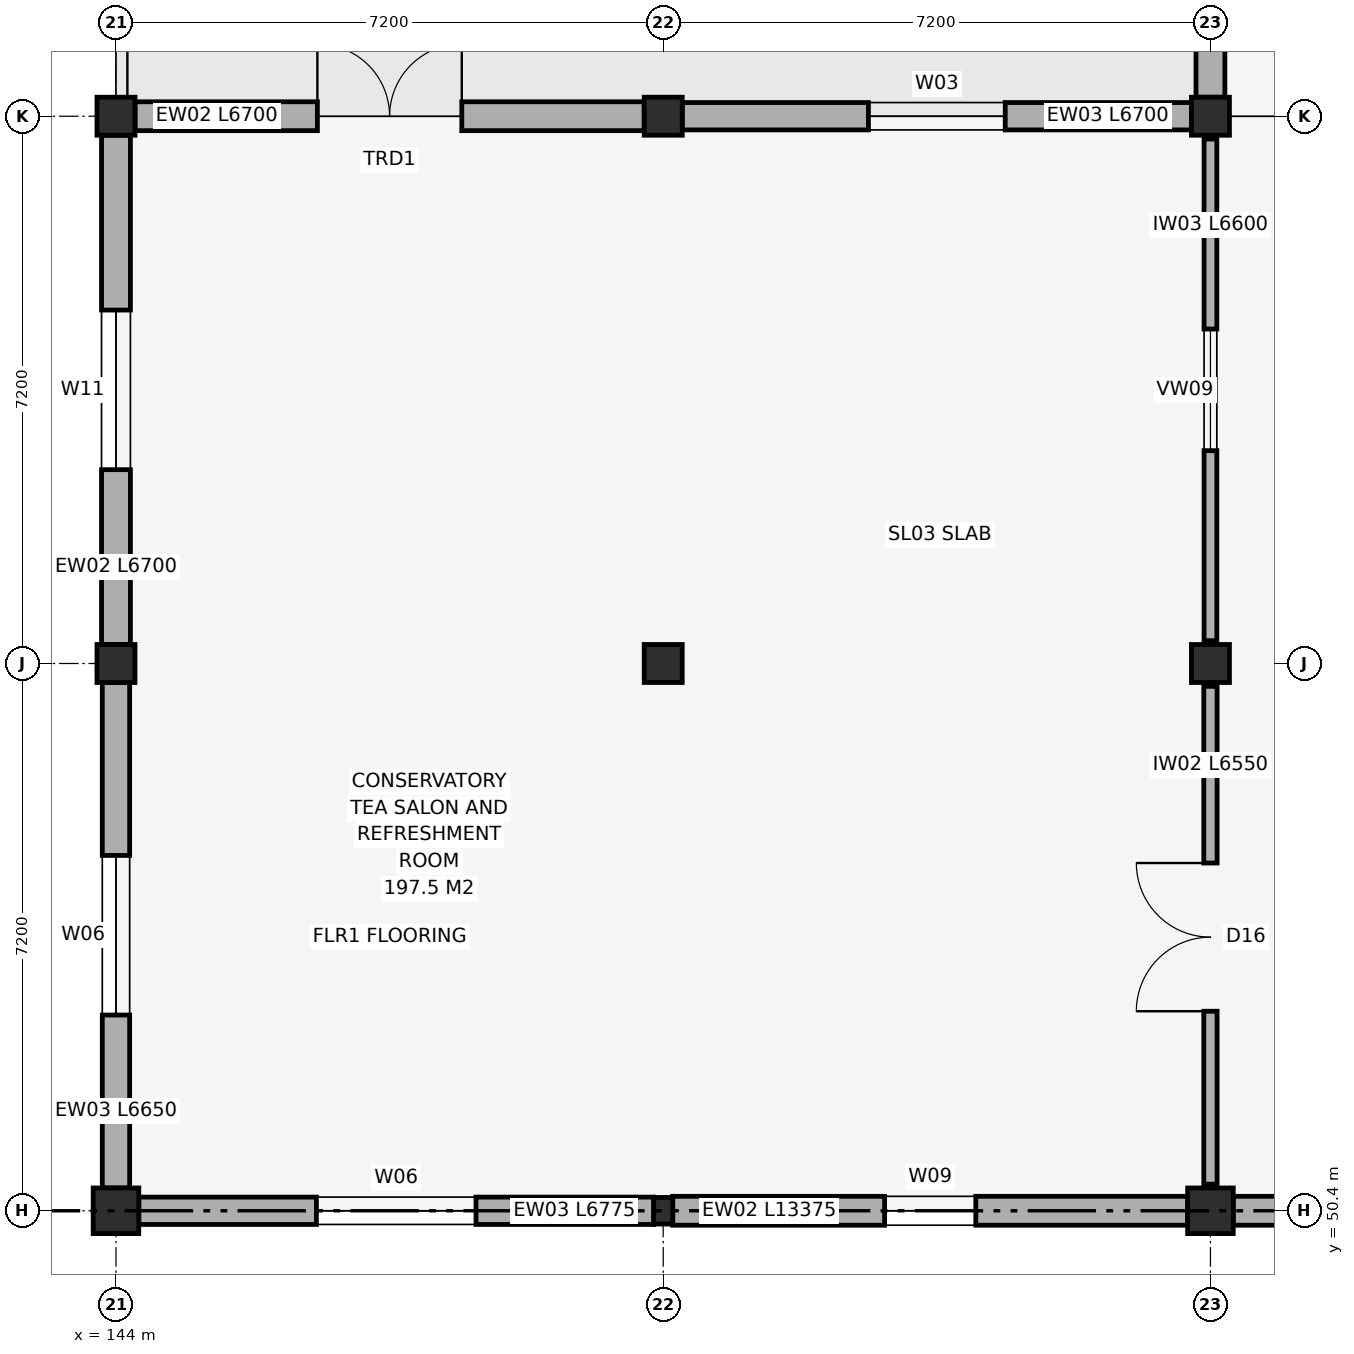
"""IFC4 building model, lengths in metres.
Left out: names, types, materials, properties, quantities, classifications, styles, units other than length and angle.
Written with IfcOpenShell. Run it as: python <this file> out.ifc"""

import sys

from ifc_helpers import new_model, si_unit, direction, frame, frame_2d, origin, origin_2d, place, context, subcontext, project, spatial, rectangle, hollow_rectangle, extrude, element, fill, save


model = new_model("IFC4")
c1 = context("Model", 3, precision=1e-05, world=origin(), true_north=direction((0.0, 1.0)))
c2 = subcontext(c1, "Body", "Model", "MODEL_VIEW")
j1 = project(units=[si_unit("LENGTHUNIT", "METRE"), si_unit("PLANEANGLEUNIT", "RADIAN")], contexts=[c1])
p1 = place(None, origin())
s1 = spatial("IfcSite", under=j1, at=p1, CompositionType="ELEMENT")
p2 = place(p1, origin())
s2 = spatial("IfcBuilding", under=s1, at=p2, CompositionType="ELEMENT")
p3 = place(p2, frame((0.0, 0.0, 15.0)))
s3 = spatial("IfcBuildingStorey", under=s2, at=p3, CompositionType="ELEMENT", Elevation=15.0)
p4 = place(p3, frame((144.0, 50.4, 0.0), z_axis=(0.0, 0.0, 1.0), x_axis=(1.0, 0.0, 0.0)))
e1 = element("IfcColumn", 1, at=p4, inside=s3, PredefinedType="COLUMN", context=c2, shape_type="SweptSolid", body=[
    extrude(rectangle(XDim=0.6, YDim=0.6, at=origin_2d()), origin(), (0.0, 0.0, 1.0), 4.04),
])
for number, where, z_axis, x_axis in (
    (2, (144.0, 57.6, 0.0), (0.0, 0.0, 1.0), (1.0, 0.0, 0.0)),
    (3, (144.0, 64.8, 0.0), (0.0, 0.0, 1.0), (1.0, 0.0, 0.0)),
):
    element("IfcColumn", number, at=place(p3, frame(where, z_axis=z_axis, x_axis=x_axis)), inside=s3, PredefinedType="COLUMN", context=c2, shape_type="SweptSolid", body=[
        extrude(rectangle(XDim=0.5, YDim=0.5, at=origin_2d()), origin(), (0.0, 0.0, 1.0), 4.04),
    ])
p5 = place(p3, frame((151.2, 50.4, 0.0), z_axis=(0.0, 0.0, 1.0), x_axis=(1.0, 0.0, 0.0)))
e4 = element("IfcColumn", 4, at=p5, inside=s3, PredefinedType="COLUMN", context=c2, shape_type="SweptSolid", body=[
    extrude(hollow_rectangle(XDim=0.25, YDim=0.35, WallThickness=0.012, at=origin_2d()), origin(), (0.0, 0.0, 1.0), 4.04),
])
for number, where, z_axis, x_axis in (
    (5, (151.2, 57.6, 0.0), (0.0, 0.0, 1.0), (1.0, 0.0, 0.0)),
    (6, (151.2, 64.8, 0.0), (0.0, 0.0, 1.0), (1.0, 0.0, 0.0)),
):
    element("IfcColumn", number, at=place(p3, frame(where, z_axis=z_axis, x_axis=x_axis)), inside=s3, PredefinedType="COLUMN", context=c2, shape_type="SweptSolid", body=[
        extrude(rectangle(XDim=0.5, YDim=0.5, at=origin_2d()), origin(), (0.0, 0.0, 1.0), 4.04),
    ])
p6 = place(p3, frame((158.4, 50.4, 0.0), z_axis=(0.0, 0.0, 1.0), x_axis=(1.0, 0.0, 0.0)))
e7 = element("IfcColumn", 7, at=p6, inside=s3, PredefinedType="COLUMN", context=c2, shape_type="SweptSolid", body=[
    extrude(rectangle(XDim=0.6, YDim=0.6, at=origin_2d()), origin(), (0.0, 0.0, 1.0), 4.04),
])
for number, where, z_axis, x_axis in (
    (8, (158.4, 57.6, 0.0), (0.0, 0.0, 1.0), (1.0, 0.0, 0.0)),
    (9, (158.4, 64.8, 0.0), (0.0, 0.0, 1.0), (1.0, 0.0, 0.0)),
):
    element("IfcColumn", number, at=place(p3, frame(where, z_axis=z_axis, x_axis=x_axis)), inside=s3, PredefinedType="COLUMN", context=c2, shape_type="SweptSolid", body=[
        extrude(rectangle(XDim=0.5, YDim=0.5, at=origin_2d()), origin(), (0.0, 0.0, 1.0), 4.04),
    ])
p7 = place(p3, frame((144.3, 50.4, 0.0), z_axis=(0.0, 0.0, 1.0), x_axis=(1.0, 0.0, 0.0)))
e10 = element("IfcWall", 10, at=p7, inside=s3, PredefinedType="SOLIDWALL", context=c2, shape_type="SweptSolid", body=[
    extrude(rectangle(XDim=6.775, YDim=0.36, at=frame_2d((3.387, 0.0))), origin(), (0.0, 0.0, 1.0), 3.65),
])
p8 = place(p7, frame((2.337, 0.0, 0.95)))
e11 = element("IfcOpeningElement", 11, at=p8, cuts=e10, PredefinedType="OPENING", context=c2, shape_type="SweptSolid", body=[
    extrude(rectangle(XDim=2.1, YDim=2.0, at=frame_2d((1.05, 1.0))), frame((0.0, 0.195, 0.0), z_axis=(0.0, -1.0, 0.0), x_axis=(1.0, 0.0, 0.0)), (0.0, 0.0, 1.0), 0.39),
])
p9 = place(p3, frame((151.325, 50.4, 0.0), z_axis=(0.0, 0.0, 1.0), x_axis=(1.0, 0.0, 0.0)))
e12 = element("IfcWall", 12, at=p9, inside=s3, PredefinedType="SOLIDWALL", context=c2, shape_type="SweptSolid", body=[
    extrude(rectangle(XDim=6.775, YDim=0.38, at=frame_2d((3.388, 0.0))), origin(), (0.0, 0.0, 1.0), 3.65),
])
p10 = place(p9, frame((2.788, 0.0, 0.95)))
e13 = element("IfcOpeningElement", 13, at=p10, cuts=e12, PredefinedType="OPENING", context=c2, shape_type="SweptSolid", body=[
    extrude(rectangle(XDim=1.2, YDim=2.0, at=frame_2d((0.6, 1.0))), frame((0.0, 0.205, 0.0), z_axis=(0.0, -1.0, 0.0), x_axis=(1.0, 0.0, 0.0)), (0.0, 0.0, 1.0), 0.41),
])
p11 = place(p3, frame((158.7, 50.4, 0.0), z_axis=(0.0, 0.0, 1.0), x_axis=(1.0, 0.0, 0.0)))
e14 = element("IfcWall", 14, at=p11, inside=s3, PredefinedType="SOLIDWALL", context=c2, shape_type="SweptSolid", body=[
    extrude(rectangle(XDim=6.6, YDim=0.38, at=frame_2d((3.3, 0.0))), origin(), (0.0, 0.0, 1.0), 3.65),
])
p12 = place(p11, frame((2.4, 0.0, 0.95)))
e15 = element("IfcOpeningElement", 15, at=p12, cuts=e14, PredefinedType="OPENING", context=c2, shape_type="SweptSolid", body=[
    extrude(rectangle(XDim=1.8, YDim=1.75, at=frame_2d((0.9, 0.875))), frame((0.0, 0.205, 0.0), z_axis=(0.0, -1.0, 0.0), x_axis=(1.0, 0.0, 0.0)), (0.0, 0.0, 1.0), 0.41),
])
p13 = place(p3, frame((144.25, 64.8, 0.0), z_axis=(0.0, 0.0, 1.0), x_axis=(1.0, 0.0, 0.0)))
e16 = element("IfcWall", 16, at=p13, inside=s3, PredefinedType="SOLIDWALL", context=c2, shape_type="SweptSolid", body=[
    extrude(rectangle(XDim=6.7, YDim=0.38, at=frame_2d((3.35, 0.0))), origin(), (0.0, 0.0, 1.0), 3.65),
])
p14 = place(p13, frame((2.4, 0.0, 0.0)))
e17 = element("IfcOpeningElement", 17, at=p14, cuts=e16, PredefinedType="OPENING", context=c2, shape_type="SweptSolid", body=[
    extrude(rectangle(XDim=1.9, YDim=2.25, at=frame_2d((0.95, 1.125))), frame((0.0, 0.205, 0.0), z_axis=(0.0, -1.0, 0.0), x_axis=(1.0, 0.0, 0.0)), (0.0, 0.0, 1.0), 0.41),
])
p15 = place(p3, frame((151.45, 64.8, 0.0), z_axis=(0.0, 0.0, 1.0), x_axis=(1.0, 0.0, 0.0)))
e18 = element("IfcWall", 18, at=p15, inside=s3, PredefinedType="SOLIDWALL", context=c2, shape_type="SweptSolid", body=[
    extrude(rectangle(XDim=6.7, YDim=0.36, at=frame_2d((3.35, 0.0))), origin(), (0.0, 0.0, 1.0), 3.65),
])
p16 = place(p15, frame((2.45, 0.0, 0.95)))
e19 = element("IfcOpeningElement", 19, at=p16, cuts=e18, PredefinedType="OPENING", context=c2, shape_type="SweptSolid", body=[
    extrude(rectangle(XDim=1.8, YDim=2.2, at=frame_2d((0.9, 1.1))), frame((0.0, 0.195, 0.0), z_axis=(0.0, -1.0, 0.0), x_axis=(1.0, 0.0, 0.0)), (0.0, 0.0, 1.0), 0.39),
])
p17 = place(p3, frame((144.0, 50.7, 0.0), z_axis=(0.0, 0.0, 1.0), x_axis=(0.0, 1.0, 0.0)))
e20 = element("IfcWall", 20, at=p17, inside=s3, PredefinedType="SOLIDWALL", context=c2, shape_type="SweptSolid", body=[
    extrude(rectangle(XDim=6.65, YDim=0.36, at=frame_2d((3.325, 0.0))), origin(), (0.0, 0.0, 1.0), 3.65),
])
p18 = place(p17, frame((2.275, 0.0, 0.95)))
e21 = element("IfcOpeningElement", 21, at=p18, cuts=e20, PredefinedType="OPENING", context=c2, shape_type="SweptSolid", body=[
    extrude(rectangle(XDim=2.1, YDim=2.0, at=frame_2d((1.05, 1.0))), frame((0.0, 0.195, 0.0), z_axis=(0.0, -1.0, 0.0), x_axis=(1.0, 0.0, 0.0)), (0.0, 0.0, 1.0), 0.39),
])
p19 = place(p3, frame((144.0, 57.85, 0.0), z_axis=(0.0, 0.0, 1.0), x_axis=(0.0, 1.0, 0.0)))
e22 = element("IfcWall", 22, at=p19, inside=s3, PredefinedType="SOLIDWALL", context=c2, shape_type="SweptSolid", body=[
    extrude(rectangle(XDim=6.7, YDim=0.38, at=frame_2d((3.35, 0.0))), origin(), (0.0, 0.0, 1.0), 3.65),
])
p20 = place(p19, frame((2.3, 0.0, 0.95)))
e23 = element("IfcOpeningElement", 23, at=p20, cuts=e22, PredefinedType="OPENING", context=c2, shape_type="SweptSolid", body=[
    extrude(rectangle(XDim=2.1, YDim=1.75, at=frame_2d((1.05, 0.875))), frame((0.0, 0.205, 0.0), z_axis=(0.0, -1.0, 0.0), x_axis=(1.0, 0.0, 0.0)), (0.0, 0.0, 1.0), 0.41),
])
p21 = place(p3, frame((158.4, 65.05, 0.0), z_axis=(0.0, 0.0, 1.0), x_axis=(0.0, 1.0, 0.0)))
e24 = element("IfcWall", 24, at=p21, inside=s3, PredefinedType="SOLIDWALL", context=c2, shape_type="SweptSolid", body=[
    extrude(rectangle(XDim=6.7, YDim=0.38, at=frame_2d((3.35, 0.0))), origin(), (0.0, 0.0, 1.0), 3.65),
])
p22 = place(p21, frame((2.3, 0.0, 0.95)))
e25 = element("IfcOpeningElement", 25, at=p22, cuts=e24, PredefinedType="OPENING", context=c2, shape_type="SweptSolid", body=[
    extrude(rectangle(XDim=2.1, YDim=2.0, at=frame_2d((1.05, 1.0))), frame((0.0, 0.205, 0.0), z_axis=(0.0, -1.0, 0.0), x_axis=(1.0, 0.0, 0.0)), (0.0, 0.0, 1.0), 0.41),
])
p23 = place(p3, frame((158.4, 50.75, 0.0), z_axis=(0.0, 0.0, 1.0), x_axis=(0.0, 1.0, 0.0)))
e26 = element("IfcWall", 26, at=p23, inside=s3, PredefinedType="PARTITIONING", context=c2, shape_type="SweptSolid", body=[
    extrude(rectangle(XDim=6.55, YDim=0.175, at=frame_2d((3.275, 0.0))), origin(), (0.0, 0.0, 1.0), 3.65),
])
p24 = place(p23, frame((2.275, 0.0, 0.0)))
e27 = element("IfcOpeningElement", 27, at=p24, cuts=e26, PredefinedType="OPENING", context=c2, shape_type="SweptSolid", body=[
    extrude(rectangle(XDim=1.95, YDim=2.25, at=frame_2d((0.975, 1.125))), frame((0.0, 0.103, 0.0), z_axis=(0.0, -1.0, 0.0), x_axis=(1.0, 0.0, 0.0)), (0.0, 0.0, 1.0), 0.205),
])
p25 = place(p3, frame((158.4, 57.9, 0.0), z_axis=(0.0, 0.0, 1.0), x_axis=(0.0, 1.0, 0.0)))
e28 = element("IfcWall", 28, at=p25, inside=s3, PredefinedType="PARTITIONING", context=c2, shape_type="SweptSolid", body=[
    extrude(rectangle(XDim=6.6, YDim=0.168, at=frame_2d((3.3, 0.0))), origin(), (0.0, 0.0, 1.0), 3.65),
])
p26 = place(p25, frame((2.5, 0.0, 0.95)))
e29 = element("IfcOpeningElement", 29, at=p26, cuts=e28, PredefinedType="OPENING", context=c2, shape_type="SweptSolid", body=[
    extrude(rectangle(XDim=1.6, YDim=1.35, at=frame_2d((0.8, 0.675))), frame((0.0, 0.099, 0.0), z_axis=(0.0, -1.0, 0.0), x_axis=(1.0, 0.0, 0.0)), (0.0, 0.0, 1.0), 0.198),
])
p27 = place(p8, origin())
e30 = element("IfcWindow", 30, at=p27, inside=s3, PartitioningType="SINGLE_PANEL", PredefinedType="WINDOW", context=c2, shape_type="SweptSolid", body=[
    extrude(rectangle(XDim=2.1, YDim=2.0, at=frame_2d((1.05, 1.0))), frame((0.0, 0.03, 0.0), z_axis=(0.0, -1.0, 0.0), x_axis=(1.0, 0.0, 0.0)), (0.0, 0.0, 1.0), 0.06),
])
fill(e11, e30)
p28 = place(p10, origin())
e31 = element("IfcWindow", 31, at=p28, inside=s3, PartitioningType="SINGLE_PANEL", PredefinedType="WINDOW", context=c2, shape_type="SweptSolid", body=[
    extrude(rectangle(XDim=1.2, YDim=2.0, at=frame_2d((0.6, 1.0))), frame((0.0, 0.03, 0.0), z_axis=(0.0, -1.0, 0.0), x_axis=(1.0, 0.0, 0.0)), (0.0, 0.0, 1.0), 0.06),
])
fill(e13, e31)
p29 = place(p14, origin())
e32 = element("IfcDoor", 32, at=p29, inside=s3, OperationType="DOUBLE_SWING_LEFT", PredefinedType="DOOR", context=c2, shape_type="SweptSolid", body=[
    extrude(rectangle(XDim=1.9, YDim=2.25, at=frame_2d((0.95, 1.125))), frame((0.0, 0.025, 0.0), z_axis=(0.0, -1.0, 0.0), x_axis=(1.0, 0.0, 0.0)), (0.0, 0.0, 1.0), 0.05),
])
fill(e17, e32)
p30 = place(p16, origin())
e33 = element("IfcWindow", 33, at=p30, inside=s3, PartitioningType="SINGLE_PANEL", PredefinedType="WINDOW", context=c2, shape_type="SweptSolid", body=[
    extrude(rectangle(XDim=1.8, YDim=2.2, at=frame_2d((0.9, 1.1))), frame((0.0, 0.03, 0.0), z_axis=(0.0, -1.0, 0.0), x_axis=(1.0, 0.0, 0.0)), (0.0, 0.0, 1.0), 0.06),
])
fill(e19, e33)
p31 = place(p18, origin())
e34 = element("IfcWindow", 34, at=p31, inside=s3, PartitioningType="SINGLE_PANEL", PredefinedType="WINDOW", context=c2, shape_type="SweptSolid", body=[
    extrude(rectangle(XDim=2.1, YDim=2.0, at=frame_2d((1.05, 1.0))), frame((0.0, 0.03, 0.0), z_axis=(0.0, -1.0, 0.0), x_axis=(1.0, 0.0, 0.0)), (0.0, 0.0, 1.0), 0.06),
])
fill(e21, e34)
p32 = place(p20, origin())
e35 = element("IfcWindow", 35, at=p32, inside=s3, PartitioningType="SINGLE_PANEL", PredefinedType="WINDOW", context=c2, shape_type="SweptSolid", body=[
    extrude(rectangle(XDim=2.1, YDim=1.75, at=frame_2d((1.05, 0.875))), frame((0.0, 0.03, 0.0), z_axis=(0.0, -1.0, 0.0), x_axis=(1.0, 0.0, 0.0)), (0.0, 0.0, 1.0), 0.06),
])
fill(e23, e35)
p33 = place(p24, origin())
e36 = element("IfcDoor", 36, at=p33, inside=s3, OperationType="DOUBLE_SWING_LEFT", PredefinedType="DOOR", context=c2, shape_type="SweptSolid", body=[
    extrude(rectangle(XDim=1.95, YDim=2.25, at=frame_2d((0.975, 1.125))), frame((0.0, 0.025, 0.0), z_axis=(0.0, -1.0, 0.0), x_axis=(1.0, 0.0, 0.0)), (0.0, 0.0, 1.0), 0.05),
])
fill(e27, e36)
p34 = place(p26, origin())
e37 = element("IfcWindow", 37, at=p34, inside=s3, PartitioningType="SINGLE_PANEL", PredefinedType="WINDOW", context=c2, shape_type="SweptSolid", body=[
    extrude(rectangle(XDim=1.6, YDim=1.35, at=frame_2d((0.8, 0.675))), frame((0.0, 0.03, 0.0), z_axis=(0.0, -1.0, 0.0), x_axis=(1.0, 0.0, 0.0)), (0.0, 0.0, 1.0), 0.06),
])
fill(e29, e37)
save(model, sys.argv[1])
